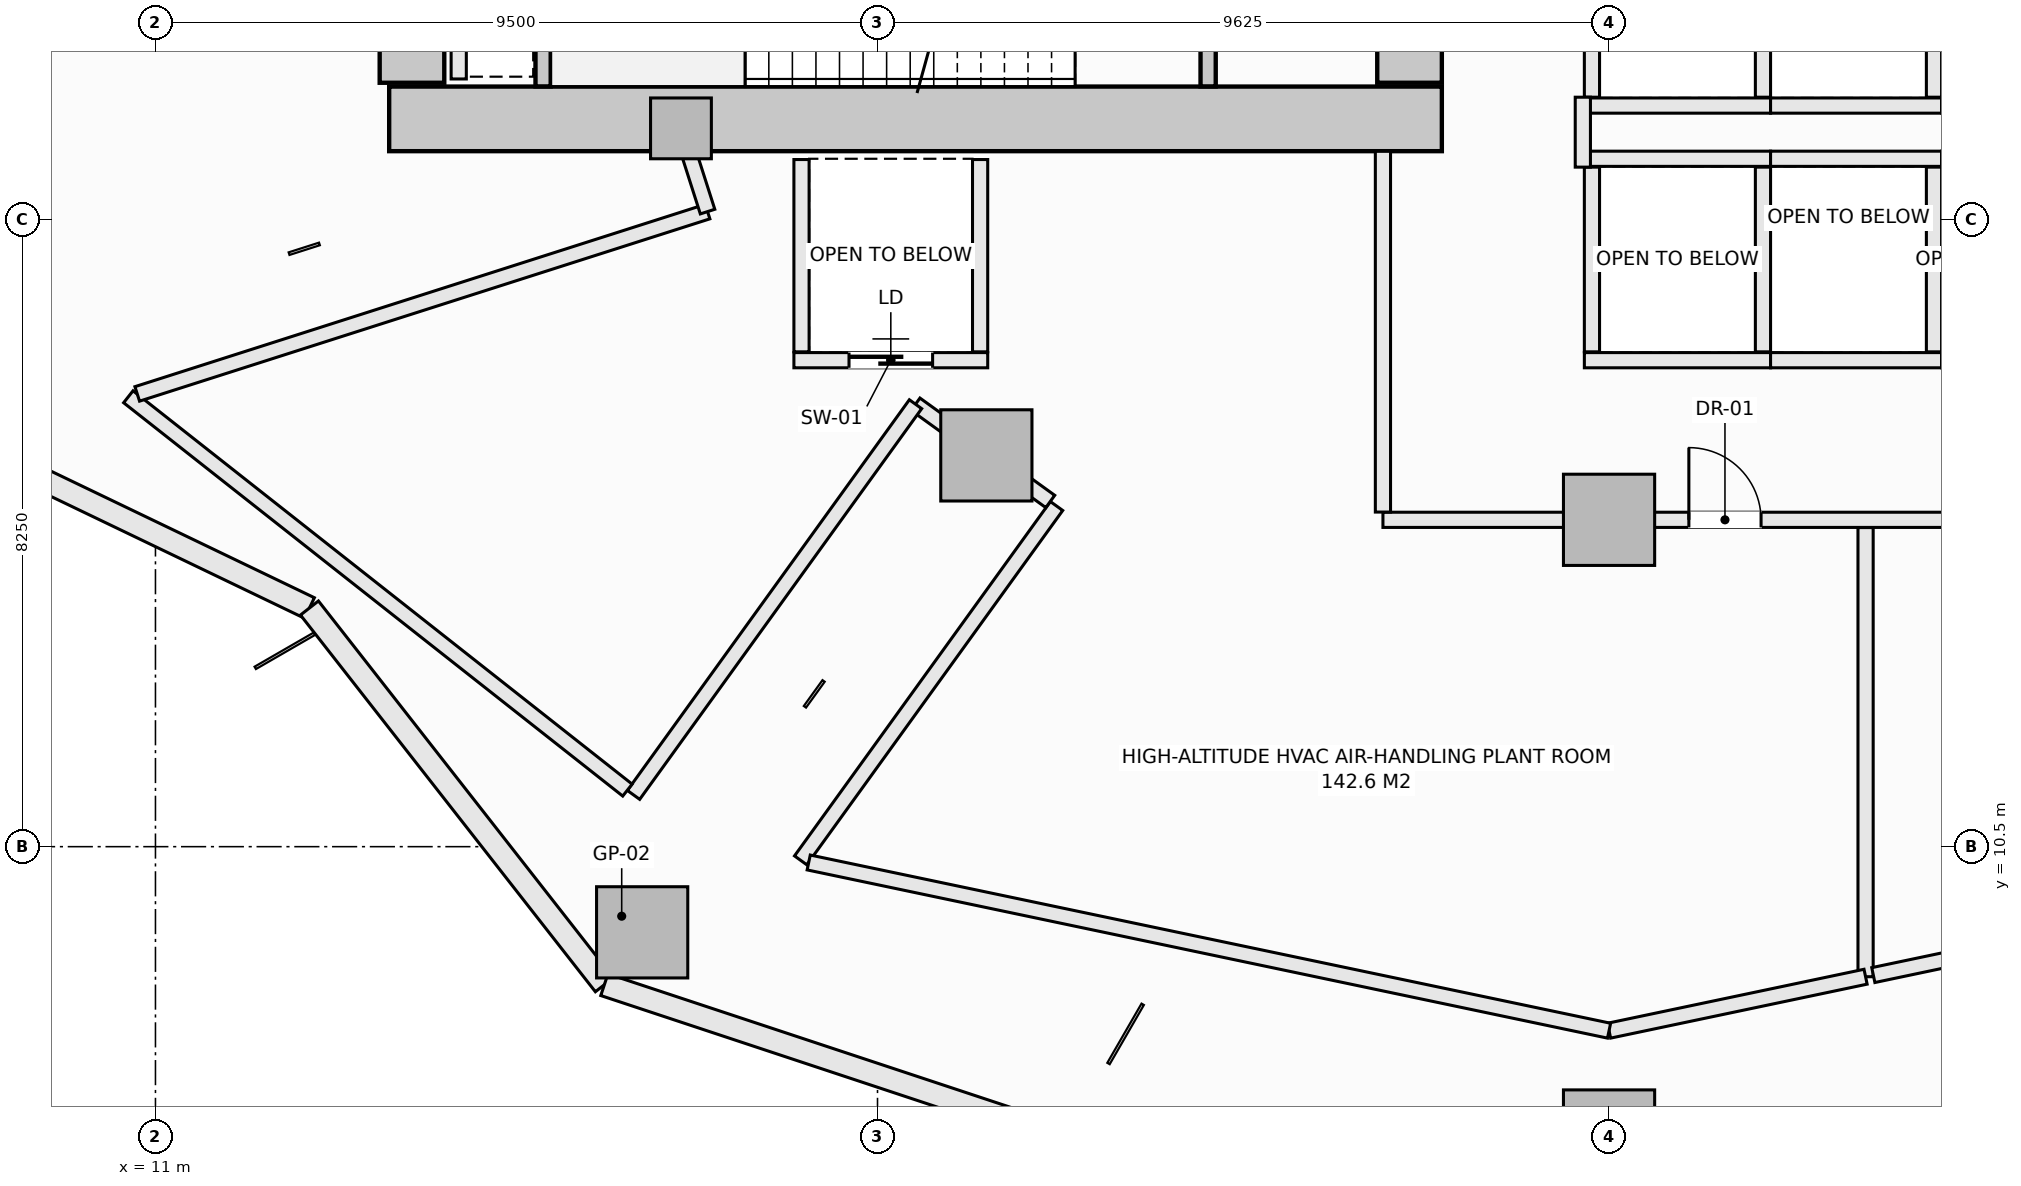
"""IFC4 building model, lengths in metres.
Left out: names, types, materials, properties, quantities, classifications, styles, units other than length and angle.
Written with IfcOpenShell. Run it as: python <this file> out.ifc"""

import sys

from ifc_helpers import new_model, si_unit, direction, frame, frame_2d, origin, origin_2d, place, context, subcontext, project, spatial, rectangle, extrude, element, fill, save


model = new_model("IFC4")
c1 = context("Model", 3, precision=1e-05, world=origin(), true_north=direction((0.0, 1.0)))
c2 = subcontext(c1, "Body", "Model", "MODEL_VIEW")
j1 = project(units=[si_unit("LENGTHUNIT", "METRE"), si_unit("PLANEANGLEUNIT", "RADIAN")], contexts=[c1])
p1 = place(None, origin())
s1 = spatial("IfcSite", under=j1, at=p1, CompositionType="ELEMENT")
p2 = place(p1, origin())
s2 = spatial("IfcBuilding", under=s1, at=p2, CompositionType="ELEMENT")
p3 = place(p2, frame((0.0, 0.0, 95.8)))
s3 = spatial("IfcBuildingStorey", under=s2, at=p3, CompositionType="ELEMENT", Elevation=95.8)
p4 = place(p3, frame((14.075, 20.075, -0.32), z_axis=(0.0, 0.0, 1.0), x_axis=(1.0, 0.0, 0.0)))
e1 = element("IfcWall", 1, at=p4, inside=s3, PredefinedType="SHEAR", context=c2, shape_type="SweptSolid", body=[
    extrude(rectangle(XDim=13.85, YDim=0.85, at=frame_2d((6.925, 0.0))), origin(), (0.0, 0.0, 1.0), 5.04),
])
p5 = place(p3, frame((14.375, 20.55, -0.32), z_axis=(0.0, 0.0, 1.0), x_axis=(0.0, 1.0, 0.0)))
e2 = element("IfcWall", 2, at=p5, inside=s3, PredefinedType="SHEAR", context=c2, shape_type="SweptSolid", body=[
    extrude(rectangle(XDim=12.9, YDim=0.85, at=frame_2d((6.45, 0.0))), origin(), (0.0, 0.0, 1.0), 5.04),
])
p6 = place(p3, frame((27.5, 20.55, -0.32), z_axis=(0.0, 0.0, 1.0), x_axis=(0.0, 1.0, 0.0)))
e3 = element("IfcWall", 3, at=p6, inside=s3, PredefinedType="SHEAR", context=c2, shape_type="SweptSolid", body=[
    extrude(rectangle(XDim=1.5, YDim=0.85, at=frame_2d((0.75, 0.0))), origin(), (0.0, 0.0, 1.0), 5.04),
])
for number, where, z_axis, x_axis in (
    (4, (17.404, 9.373, -0.32), (0.0, 0.0, 1.0), (1.0, 0.0, 0.0)),
    (5, (30.125, 6.7, -0.32), (0.0, 0.0, 1.0), (1.0, 0.0, 0.0)),
    (6, (21.932, 15.648, -0.32), (0.0, 0.0, 1.0), (1.0, 0.0, 0.0)),
    (7, (30.125, 14.8, -0.32), (0.0, 0.0, 1.0), (1.0, 0.0, 0.0)),
):
    element("IfcColumn", number, at=place(p3, frame(where, z_axis=z_axis, x_axis=x_axis)), inside=s3, PredefinedType="COLUMN", context=c2, shape_type="SweptSolid", body=[
        extrude(rectangle(XDim=1.2, YDim=1.2, at=origin_2d()), origin(), (0.0, 0.0, 1.0), 5.04),
    ])
p7 = place(p3, frame((17.914, 19.95, -0.32), z_axis=(0.0, 0.0, 1.0), x_axis=(1.0, 0.0, 0.0)))
e8 = element("IfcColumn", 8, at=p7, inside=s3, PredefinedType="PILASTER", context=c2, shape_type="SweptSolid", body=[
    extrude(rectangle(XDim=0.8, YDim=0.8, at=origin_2d()), origin(), (0.0, 0.0, 1.0), 5.04),
])
p8 = place(p3, frame((7.229, 16.425, 0.0), z_axis=(0.0, 0.0, 1.0), x_axis=(0.901354747727, -0.433081538224, 0.0)))
e9 = element("IfcWall", 9, at=p8, inside=s3, PredefinedType="SOLIDWALL", context=c2, shape_type="SweptSolid", body=[
    extrude(rectangle(XDim=6.431, YDim=0.3, at=frame_2d((3.215, 0.0))), origin(), (0.0, 0.0, 1.0), 1.15),
])
p9 = place(p3, frame((13.026, 13.64, 0.0), z_axis=(0.0, 0.0, 1.0), x_axis=(0.616434798832, -0.78740595552, 0.0)))
e10 = element("IfcWall", 10, at=p9, inside=s3, PredefinedType="SOLIDWALL", context=c2, shape_type="SweptSolid", body=[
    extrude(rectangle(XDim=6.294, YDim=0.3, at=frame_2d((3.147, 0.0))), origin(), (0.0, 0.0, 1.0), 1.15),
])
p10 = place(p3, frame((16.906, 8.684, 0.0), z_axis=(0.0, 0.0, 1.0), x_axis=(0.949245153629, -0.314537181127, 0.0)))
e11 = element("IfcWall", 11, at=p10, inside=s3, PredefinedType="SOLIDWALL", context=c2, shape_type="SweptSolid", body=[
    extrude(rectangle(XDim=6.717, YDim=0.3, at=frame_2d((3.358, 0.0))), origin(), (0.0, 0.0, 1.0), 1.15),
])
p11 = place(p3, frame((24.85, 20.502, -0.32), z_axis=(0.0, 0.0, 1.0), x_axis=(0.0, 1.0, 0.0)))
e12 = element("IfcWall", 12, at=p11, inside=s3, PredefinedType="SHEAR", context=c2, shape_type="SweptSolid", body=[
    extrude(rectangle(XDim=3.038, YDim=0.2, at=frame_2d((1.519, 0.0))), origin(), (0.0, 0.0, 1.0), 5.04),
])
p12 = place(p11, frame((0.969, 0.0, 0.32)))
e13 = element("IfcOpeningElement", 13, at=p12, cuts=e12, PredefinedType="OPENING", context=c2, shape_type="SweptSolid", body=[
    extrude(rectangle(XDim=1.1, YDim=2.15, at=frame_2d((0.55, 1.075))), frame((0.0, 0.11, 0.0), z_axis=(0.0, -1.0, 0.0), x_axis=(1.0, 0.0, 0.0)), (0.0, 0.0, 1.0), 0.22),
])
p13 = place(p3, frame((16.1, 20.502, -0.32), z_axis=(0.0, 0.0, 1.0), x_axis=(0.0, 1.0, 0.0)))
e14 = element("IfcWall", 14, at=p13, inside=s3, PredefinedType="SHEAR", context=c2, shape_type="SweptSolid", body=[
    extrude(rectangle(XDim=3.036, YDim=0.2, at=frame_2d((1.518, 0.0))), origin(), (0.0, 0.0, 1.0), 5.04),
])
p14 = place(p3, frame((19.4, 16.9, 0.0), z_axis=(0.0, 0.0, 1.0), x_axis=(1.0, 0.0, 0.0)))
e15 = element("IfcWall", 15, at=p14, inside=s3, PredefinedType="SOLIDWALL", context=c2, shape_type="SweptSolid", body=[
    extrude(rectangle(XDim=2.55, YDim=0.2, at=frame_2d((1.275, 0.0))), origin(), (0.0, 0.0, 1.0), 4.72),
])
p15 = place(p14, frame((0.725, 0.0, 0.0)))
e16 = element("IfcOpeningElement", 16, at=p15, cuts=e15, PredefinedType="OPENING", context=c2, shape_type="SweptSolid", body=[
    extrude(rectangle(XDim=1.1, YDim=2.2, at=frame_2d((0.55, 1.1))), frame((0.0, 0.11, 0.0), z_axis=(0.0, -1.0, 0.0), x_axis=(1.0, 0.0, 0.0)), (0.0, 0.0, 1.0), 0.22),
])
for number, where, z_axis, x_axis in (
    (17, (19.5, 17.01, 0.0), (0.0, 0.0, 1.0), (0.0, 1.0, 0.0)),
    (18, (21.85, 17.01, 0.0), (0.0, 0.0, 1.0), (0.0, 1.0, 0.0)),
):
    element("IfcWall", number, at=place(p3, frame(where, z_axis=z_axis, x_axis=x_axis)), inside=s3, PredefinedType="SOLIDWALL", context=c2, shape_type="SweptSolid", body=[
        extrude(rectangle(XDim=2.53, YDim=0.2, at=frame_2d((1.265, 0.0))), origin(), (0.0, 0.0, 1.0), 4.72),
    ])
for number, where, z_axis, x_axis in (
    (19, (29.8, 19.55, 0.0), (0.0, 0.0, 1.0), (1.0, 0.0, 0.0)),
    (20, (29.8, 16.9, 0.0), (0.0, 0.0, 1.0), (1.0, 0.0, 0.0)),
):
    element("IfcWall", number, at=place(p3, frame(where, z_axis=z_axis, x_axis=x_axis)), inside=s3, PredefinedType="SOLIDWALL", context=c2, shape_type="SweptSolid", body=[
        extrude(rectangle(XDim=2.45, YDim=0.2, at=frame_2d((1.225, 0.0))), origin(), (0.0, 0.0, 1.0), 4.72),
    ])
for number, where, z_axis, x_axis in (
    (21, (29.9, 17.01, 0.0), (0.0, 0.0, 1.0), (0.0, 1.0, 0.0)),
    (22, (32.15, 17.01, 0.0), (0.0, 0.0, 1.0), (0.0, 1.0, 0.0)),
):
    element("IfcWall", number, at=place(p3, frame(where, z_axis=z_axis, x_axis=x_axis)), inside=s3, PredefinedType="SOLIDWALL", context=c2, shape_type="SweptSolid", body=[
        extrude(rectangle(XDim=2.43, YDim=0.2, at=frame_2d((1.215, 0.0))), origin(), (0.0, 0.0, 1.0), 4.72),
    ])
for number, where, z_axis, x_axis in (
    (23, (32.25, 19.55, 0.0), (0.0, 0.0, 1.0), (1.0, 0.0, 0.0)),
    (24, (32.25, 16.9, 0.0), (0.0, 0.0, 1.0), (1.0, 0.0, 0.0)),
):
    element("IfcWall", number, at=place(p3, frame(where, z_axis=z_axis, x_axis=x_axis)), inside=s3, PredefinedType="SOLIDWALL", context=c2, shape_type="SweptSolid", body=[
        extrude(rectangle(XDim=2.25, YDim=0.2, at=frame_2d((1.125, 0.0))), origin(), (0.0, 0.0, 1.0), 4.72),
    ])
p16 = place(p3, frame((34.4, 17.01, 0.0), z_axis=(0.0, 0.0, 1.0), x_axis=(0.0, 1.0, 0.0)))
e25 = element("IfcWall", 25, at=p16, inside=s3, PredefinedType="SOLIDWALL", context=c2, shape_type="SweptSolid", body=[
    extrude(rectangle(XDim=2.43, YDim=0.2, at=frame_2d((1.215, 0.0))), origin(), (0.0, 0.0, 1.0), 4.72),
])
p17 = place(p3, frame((29.8, 20.25, 0.0), z_axis=(0.0, 0.0, 1.0), x_axis=(1.0, 0.0, 0.0)))
e26 = element("IfcWall", 26, at=p17, inside=s3, PredefinedType="SOLIDWALL", context=c2, shape_type="SweptSolid", body=[
    extrude(rectangle(XDim=2.45, YDim=0.2, at=frame_2d((1.225, 0.0))), origin(), (0.0, 0.0, 1.0), 4.72),
])
for number, where, z_axis, x_axis in (
    (27, (29.9, 20.36, 0.0), (0.0, 0.0, 1.0), (0.0, 1.0, 0.0)),
    (28, (32.15, 20.36, 0.0), (0.0, 0.0, 1.0), (0.0, 1.0, 0.0)),
):
    element("IfcWall", number, at=place(p3, frame(where, z_axis=z_axis, x_axis=x_axis)), inside=s3, PredefinedType="SOLIDWALL", context=c2, shape_type="SweptSolid", body=[
        extrude(rectangle(XDim=2.43, YDim=0.2, at=frame_2d((1.215, 0.0))), origin(), (0.0, 0.0, 1.0), 4.72),
    ])
p18 = place(p3, frame((32.25, 20.25, 0.0), z_axis=(0.0, 0.0, 1.0), x_axis=(1.0, 0.0, 0.0)))
e29 = element("IfcWall", 29, at=p18, inside=s3, PredefinedType="SOLIDWALL", context=c2, shape_type="SweptSolid", body=[
    extrude(rectangle(XDim=2.25, YDim=0.2, at=frame_2d((1.125, 0.0))), origin(), (0.0, 0.0, 1.0), 4.72),
])
p19 = place(p3, frame((34.4, 20.36, 0.0), z_axis=(0.0, 0.0, 1.0), x_axis=(0.0, 1.0, 0.0)))
e30 = element("IfcWall", 30, at=p19, inside=s3, PredefinedType="SOLIDWALL", context=c2, shape_type="SweptSolid", body=[
    extrude(rectangle(XDim=2.43, YDim=0.2, at=frame_2d((1.215, 0.0))), origin(), (0.0, 0.0, 1.0), 4.72),
])
p20 = place(p3, frame((14.99, 20.6, 0.0), z_axis=(0.0, 0.0, 1.0), x_axis=(0.0, 1.0, 0.0)))
e31 = element("IfcWall", 31, at=p20, inside=s3, PredefinedType="SOLIDWALL", context=c2, shape_type="SweptSolid", body=[
    extrude(rectangle(XDim=2.85, YDim=0.2, at=frame_2d((1.425, 0.0))), origin(), (0.0, 0.0, 1.0), 4.72),
])
p21 = place(p3, frame((27.15, 14.8, 0.0), z_axis=(0.0, 0.0, 1.0), x_axis=(1.0, 0.0, 0.0)))
e32 = element("IfcWall", 32, at=p21, inside=s3, PredefinedType="SOLIDWALL", context=c2, shape_type="SweptSolid", body=[
    extrude(rectangle(XDim=11.768, YDim=0.2, at=frame_2d((5.884, 0.0))), origin(), (0.0, 0.0, 1.0), 4.084),
])
p22 = place(p21, frame((4.025, 0.0, 0.0)))
e33 = element("IfcOpeningElement", 33, at=p22, cuts=e32, PredefinedType="OPENING", context=c2, shape_type="SweptSolid", body=[
    extrude(rectangle(XDim=0.95, YDim=2.1, at=frame_2d((0.475, 1.05))), frame((0.0, 0.11, 0.0), z_axis=(0.0, -1.0, 0.0), x_axis=(1.0, 0.0, 0.0)), (0.0, 0.0, 1.0), 0.22),
])
p23 = place(p21, frame((8.379, 0.0, 0.0)))
e34 = element("IfcOpeningElement", 34, at=p23, cuts=e32, PredefinedType="OPENING", context=c2, shape_type="SweptSolid", body=[
    extrude(rectangle(XDim=0.95, YDim=2.1, at=frame_2d((0.475, 1.05))), frame((0.0, 0.11, 0.0), z_axis=(0.0, -1.0, 0.0), x_axis=(1.0, 0.0, 0.0)), (0.0, 0.0, 1.0), 0.22),
])
p24 = place(p3, frame((27.15, 14.902, 0.0), z_axis=(0.0, 0.0, 1.0), x_axis=(0.0, 1.0, 0.0)))
e35 = element("IfcWall", 35, at=p24, inside=s3, PredefinedType="SOLIDWALL", context=c2, shape_type="SweptSolid", body=[
    extrude(rectangle(XDim=4.746, YDim=0.2, at=frame_2d((2.373, 0.0))), origin(), (0.0, 0.0, 1.0), 4.72),
])
p25 = place(p3, frame((29.78, 19.44, 0.0), z_axis=(0.0, 0.0, 1.0), x_axis=(0.0, 1.0, 0.0)))
e36 = element("IfcWall", 36, at=p25, inside=s3, PredefinedType="SOLIDWALL", context=c2, shape_type="SweptSolid", body=[
    extrude(rectangle(XDim=0.92, YDim=0.2, at=frame_2d((0.46, 0.0))), origin(), (0.0, 0.0, 1.0), 4.72),
])
p26 = place(p3, frame((19.489, 10.32, 0.0), z_axis=(0.0, 0.0, 1.0), x_axis=(0.585467301876, 0.810696020981, 0.0)))
e37 = element("IfcWall", 37, at=p26, inside=s3, PredefinedType="SOLIDWALL", context=c2, shape_type="SweptSolid", body=[
    extrude(rectangle(XDim=5.75, YDim=0.2, at=frame_2d((2.875, 0.0))), origin(), (0.0, 0.0, 1.0), 4.72),
])
p27 = place(p3, frame((21.0, 16.321, 0.0), z_axis=(0.0, 0.0, 1.0), x_axis=(0.810864655863, -0.585233722433, 0.0)))
e38 = element("IfcWall", 38, at=p27, inside=s3, PredefinedType="SOLIDWALL", context=c2, shape_type="SweptSolid", body=[
    extrude(rectangle(XDim=2.187, YDim=0.2, at=frame_2d((1.093, 0.0))), origin(), (0.0, 0.0, 1.0), 4.084),
])
p28 = place(p3, frame((17.29, 11.181, 0.0), z_axis=(0.0, 0.0, 1.0), x_axis=(0.58524585539, 0.81085589888, 0.0)))
e39 = element("IfcWall", 39, at=p28, inside=s3, PredefinedType="SOLIDWALL", context=c2, shape_type="SweptSolid", body=[
    extrude(rectangle(XDim=6.339, YDim=0.2, at=frame_2d((3.169, 0.0))), origin(), (0.0, 0.0, 1.0), 4.72),
])
p29 = place(p3, frame((10.643, 16.419, 0.0), z_axis=(0.0, 0.0, 1.0), x_axis=(0.785428864587, -0.618951935673, 0.0)))
e40 = element("IfcWall", 40, at=p29, inside=s3, PredefinedType="SOLIDWALL", context=c2, shape_type="SweptSolid", body=[
    extrude(rectangle(XDim=8.361, YDim=0.2, at=frame_2d((4.18, 0.0))), origin(), (0.0, 0.0, 1.0), 4.72),
])
p30 = place(p3, frame((10.76, 16.457, 0.0), z_axis=(0.0, 0.0, 1.0), x_axis=(0.95252485138, 0.304460847241, 0.0)))
e41 = element("IfcWall", 41, at=p30, inside=s3, PredefinedType="SOLIDWALL", context=c2, shape_type="SweptSolid", body=[
    extrude(rectangle(XDim=7.878, YDim=0.2, at=frame_2d((3.939, 0.0))), origin(), (0.0, 0.0, 1.0), 4.72),
])
p31 = place(p3, frame((18.01, 19.648, 0.0), z_axis=(0.0, 0.0, 1.0), x_axis=(0.30441390655, -0.952539854021, 0.0)))
e42 = element("IfcWall", 42, at=p31, inside=s3, PredefinedType="SOLIDWALL", context=c2, shape_type="SweptSolid", body=[
    extrude(rectangle(XDim=0.833, YDim=0.2, at=frame_2d((0.416, 0.0))), origin(), (0.0, 0.0, 1.0), 4.084),
])
p32 = place(p3, frame((33.5, 8.789, 0.0), z_axis=(0.0, 0.0, 1.0), x_axis=(0.0, 1.0, 0.0)))
e43 = element("IfcWall", 43, at=p32, inside=s3, PredefinedType="SOLIDWALL", context=c2, shape_type="SweptSolid", body=[
    extrude(rectangle(XDim=5.909, YDim=0.2, at=frame_2d((2.955, 0.0))), origin(), (0.0, 0.0, 1.0), 4.72),
])
p33 = place(p3, frame((30.125, 8.079, 0.0), z_axis=(0.0, 0.0, 1.0), x_axis=(0.978582819635, 0.205853504015, 0.0)))
e44 = element("IfcWall", 44, at=p33, inside=s3, PredefinedType="SOLIDWALL", context=c2, shape_type="SweptSolid", body=[
    extrude(rectangle(XDim=3.449, YDim=0.2, at=frame_2d((1.725, 0.0))), origin(), (0.0, 0.0, 1.0), 4.72),
])
p34 = place(p3, frame((33.602, 8.81, 0.0), z_axis=(0.0, 0.0, 1.0), x_axis=(0.978580818076, 0.205863018764, 0.0)))
e45 = element("IfcWall", 45, at=p34, inside=s3, PredefinedType="SOLIDWALL", context=c2, shape_type="SweptSolid", body=[
    extrude(rectangle(XDim=8.845, YDim=0.2, at=frame_2d((4.422, 0.0))), origin(), (0.0, 0.0, 1.0), 4.72),
])
p35 = place(p3, frame((19.595, 10.292, 0.0), z_axis=(0.0, 0.0, 1.0), x_axis=(0.978624828586, -0.205653701342, 0.0)))
e46 = element("IfcWall", 46, at=p35, inside=s3, PredefinedType="SOLIDWALL", context=c2, shape_type="SweptSolid", body=[
    extrude(rectangle(XDim=10.76, YDim=0.2, at=frame_2d((5.38, 0.0))), origin(), (0.0, 0.0, 1.0), 4.72),
])
p36 = place(p15, origin())
e47 = element("IfcDoor", 47, at=p36, inside=s3, OperationType="SLIDING_TO_LEFT", PredefinedType="DOOR", context=c2, shape_type="SweptSolid", body=[
    extrude(rectangle(XDim=1.1, YDim=2.2, at=frame_2d((0.55, 1.1))), frame((0.0, 0.025, 0.0), z_axis=(0.0, -1.0, 0.0), x_axis=(1.0, 0.0, 0.0)), (0.0, 0.0, 1.0), 0.05),
])
fill(e16, e47)
p37 = place(p22, origin())
e48 = element("IfcDoor", 48, at=p37, inside=s3, OperationType="SINGLE_SWING_LEFT", PredefinedType="DOOR", context=c2, shape_type="SweptSolid", body=[
    extrude(rectangle(XDim=0.95, YDim=2.1, at=frame_2d((0.475, 1.05))), frame((0.0, 0.025, 0.0), z_axis=(0.0, -1.0, 0.0), x_axis=(1.0, 0.0, 0.0)), (0.0, 0.0, 1.0), 0.05),
])
fill(e33, e48)
save(model, sys.argv[1])
